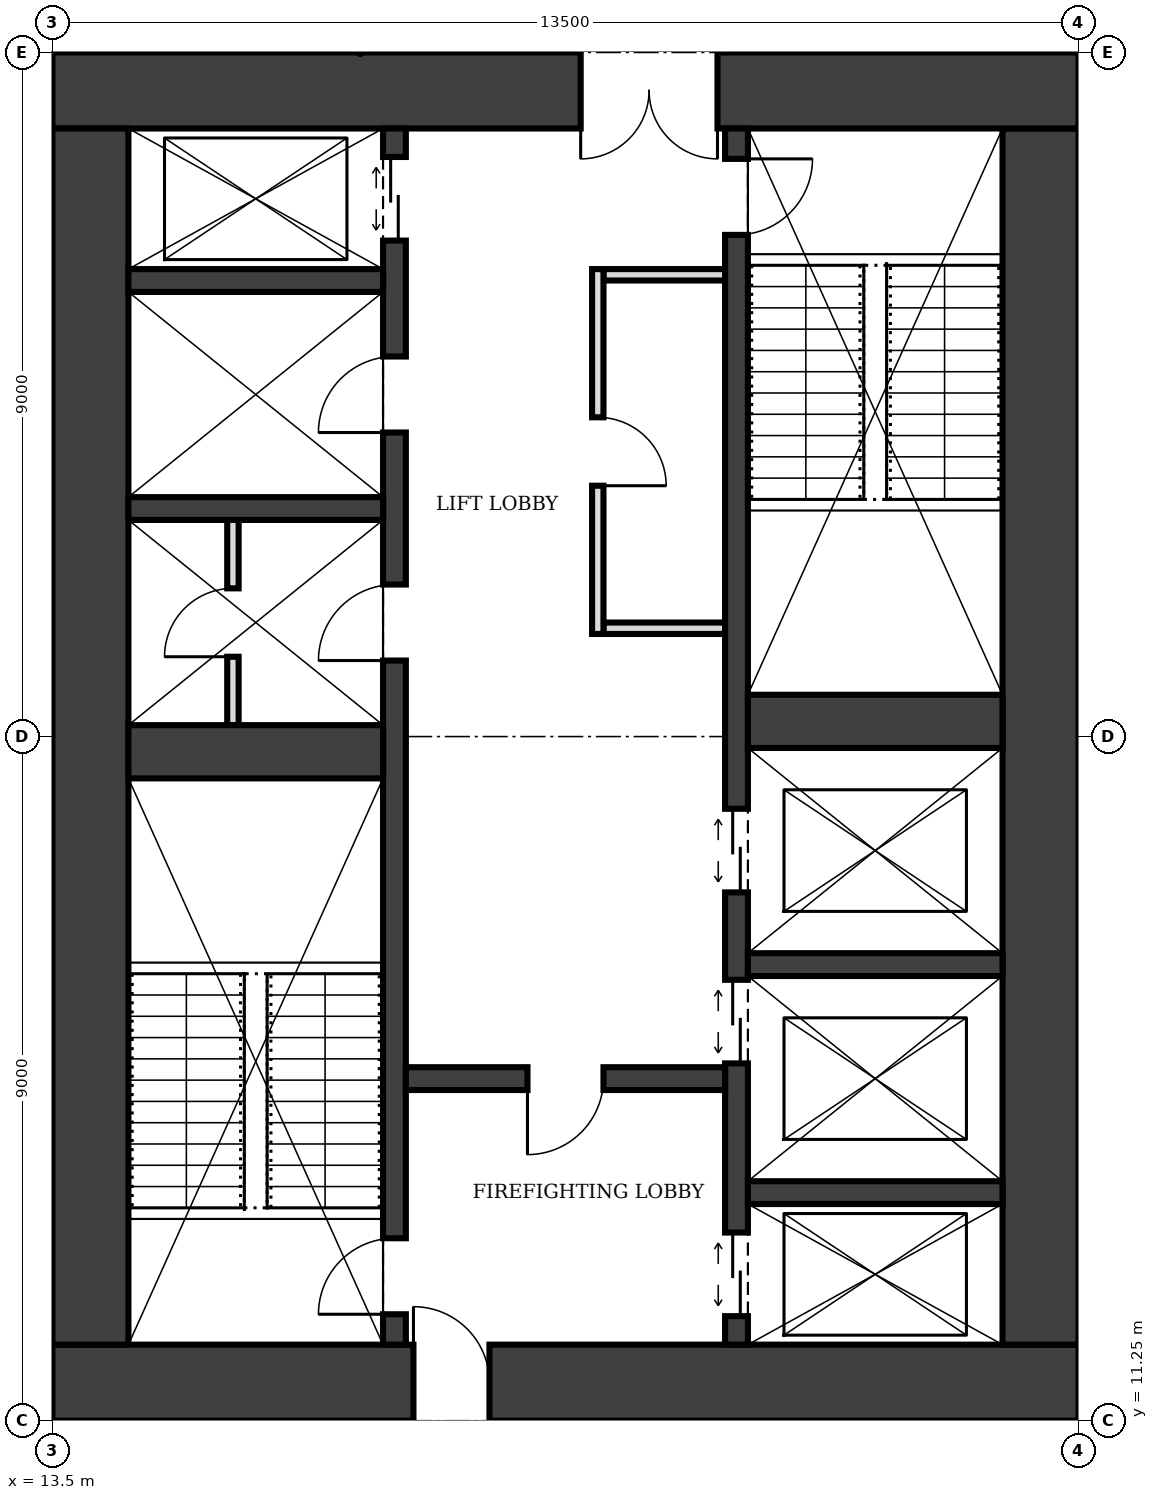
"""IFC4 building model, lengths in metres.
Left out: names, types, materials, properties, quantities, classifications, styles, units other than length and angle.
Written with IfcOpenShell. Run it as: python <this file> out.ifc"""

import sys

from ifc_helpers import new_model, si_unit, direction, frame, frame_2d, origin, place, context, subcontext, project, spatial, rectangle, extrude, element, fill, save


model = new_model("IFC4")
c1 = context("Model", 3, precision=1e-05, world=origin(), true_north=direction((0.0, 1.0)))
c2 = subcontext(c1, "Body", "Model", "MODEL_VIEW")
j1 = project(units=[si_unit("LENGTHUNIT", "METRE"), si_unit("PLANEANGLEUNIT", "RADIAN")], contexts=[c1])
p1 = place(None, origin())
s1 = spatial("IfcSite", under=j1, at=p1, CompositionType="ELEMENT")
p2 = place(p1, origin())
s2 = spatial("IfcBuilding", under=s1, at=p2, CompositionType="ELEMENT")
p3 = place(p2, frame((0.0, 0.0, 205.0)))
s3 = spatial("IfcBuildingStorey", under=s2, at=p3, CompositionType="ELEMENT", Elevation=205.0)
p4 = place(p3, frame((13.5, 11.75, 0.0), z_axis=(0.0, 0.0, 1.0), x_axis=(1.0, 0.0, 0.0)))
e1 = element("IfcWall", 1, at=p4, inside=s3, PredefinedType="SHEAR", context=c2, shape_type="SweptSolid", body=[
    extrude(rectangle(XDim=13.5, YDim=1.0, at=frame_2d((6.75, 0.0))), origin(), (0.0, 0.0, 1.0), 4.0),
])
p5 = place(p4, frame((4.75, 0.0, 0.0)))
e2 = element("IfcOpeningElement", 2, at=p5, cuts=e1, PredefinedType="OPENING", context=c2, shape_type="SweptSolid", body=[
    extrude(rectangle(XDim=1.0, YDim=2.1, at=frame_2d((0.5, 1.05))), frame((0.0, 0.51, 0.0), z_axis=(0.0, -1.0, 0.0), x_axis=(1.0, 0.0, 0.0)), (0.0, 0.0, 1.0), 1.02),
])
p6 = place(p3, frame((26.5, 12.25, 0.0), z_axis=(0.0, 0.0, 1.0), x_axis=(0.0, 1.0, 0.0)))
e3 = element("IfcWall", 3, at=p6, inside=s3, PredefinedType="SHEAR", context=c2, shape_type="SweptSolid", body=[
    extrude(rectangle(XDim=16.0, YDim=1.0, at=frame_2d((8.0, 0.0))), origin(), (0.0, 0.0, 1.0), 4.0),
])
p7 = place(p3, frame((27.0, 28.75, 0.0), z_axis=(0.0, 0.0, 1.0), x_axis=(-1.0, 0.0, 0.0)))
e4 = element("IfcWall", 4, at=p7, inside=s3, PredefinedType="SHEAR", context=c2, shape_type="SweptSolid", body=[
    extrude(rectangle(XDim=13.5, YDim=1.0, at=frame_2d((6.75, 0.0))), origin(), (0.0, 0.0, 1.0), 4.0),
])
p8 = place(p7, frame((4.75, 0.0, 0.0)))
e5 = element("IfcOpeningElement", 5, at=p8, cuts=e4, PredefinedType="OPENING", context=c2, shape_type="SweptSolid", body=[
    extrude(rectangle(XDim=1.8, YDim=2.1, at=frame_2d((0.9, 1.05))), frame((0.0, 0.51, 0.0), z_axis=(0.0, -1.0, 0.0), x_axis=(1.0, 0.0, 0.0)), (0.0, 0.0, 1.0), 1.02),
])
p9 = place(p3, frame((14.0, 28.25, 0.0), z_axis=(0.0, 0.0, 1.0), x_axis=(0.0, -1.0, 0.0)))
e6 = element("IfcWall", 6, at=p9, inside=s3, PredefinedType="SHEAR", context=c2, shape_type="SweptSolid", body=[
    extrude(rectangle(XDim=16.0, YDim=1.0, at=frame_2d((8.0, 0.0))), origin(), (0.0, 0.0, 1.0), 4.0),
])
p10 = place(p3, frame((18.0, 12.25, 0.0), z_axis=(0.0, 0.0, 1.0), x_axis=(0.0, 1.0, 0.0)))
e7 = element("IfcWall", 7, at=p10, inside=s3, PredefinedType="SHEAR", context=c2, shape_type="SweptSolid", body=[
    extrude(rectangle(XDim=16.0, YDim=0.3, at=frame_2d((8.0, 0.0))), origin(), (0.0, 0.0, 1.0), 4.0),
])
p11 = place(p10, frame((0.4, 0.0, 0.0)))
e8 = element("IfcOpeningElement", 8, at=p11, cuts=e7, PredefinedType="OPENING", context=c2, shape_type="SweptSolid", body=[
    extrude(rectangle(XDim=1.0, YDim=2.1, at=frame_2d((0.5, 1.05))), frame((0.0, 0.16, 0.0), z_axis=(0.0, -1.0, 0.0), x_axis=(1.0, 0.0, 0.0)), (0.0, 0.0, 1.0), 0.32),
])
p12 = place(p10, frame((14.525, 0.0, 0.0)))
e9 = element("IfcOpeningElement", 9, at=p12, cuts=e7, PredefinedType="OPENING", context=c2, shape_type="SweptSolid", body=[
    extrude(rectangle(XDim=1.1, YDim=2.1, at=frame_2d((0.55, 1.05))), frame((0.0, 0.16, 0.0), z_axis=(0.0, -1.0, 0.0), x_axis=(1.0, 0.0, 0.0)), (0.0, 0.0, 1.0), 0.32),
])
p13 = place(p10, frame((9.0, 0.0, 0.0)))
e10 = element("IfcOpeningElement", 10, at=p13, cuts=e7, PredefinedType="OPENING", context=c2, shape_type="SweptSolid", body=[
    extrude(rectangle(XDim=1.0, YDim=2.1, at=frame_2d((0.5, 1.05))), frame((0.0, 0.16, 0.0), z_axis=(0.0, -1.0, 0.0), x_axis=(1.0, 0.0, 0.0)), (0.0, 0.0, 1.0), 0.32),
])
p14 = place(p10, frame((12.0, 0.0, 0.0)))
e11 = element("IfcOpeningElement", 11, at=p14, cuts=e7, PredefinedType="OPENING", context=c2, shape_type="SweptSolid", body=[
    extrude(rectangle(XDim=1.0, YDim=2.1, at=frame_2d((0.5, 1.05))), frame((0.0, 0.16, 0.0), z_axis=(0.0, -1.0, 0.0), x_axis=(1.0, 0.0, 0.0)), (0.0, 0.0, 1.0), 0.32),
])
p15 = place(p3, frame((22.5, 12.25, 0.0), z_axis=(0.0, 0.0, 1.0), x_axis=(0.0, 1.0, 0.0)))
e12 = element("IfcWall", 12, at=p15, inside=s3, PredefinedType="SHEAR", context=c2, shape_type="SweptSolid", body=[
    extrude(rectangle(XDim=16.0, YDim=0.3, at=frame_2d((8.0, 0.0))), origin(), (0.0, 0.0, 1.0), 4.0),
])
p16 = place(p15, frame((14.6, 0.0, 0.0)))
e13 = element("IfcOpeningElement", 13, at=p16, cuts=e12, PredefinedType="OPENING", context=c2, shape_type="SweptSolid", body=[
    extrude(rectangle(XDim=1.0, YDim=2.1, at=frame_2d((0.5, 1.05))), frame((0.0, 0.16, 0.0), z_axis=(0.0, -1.0, 0.0), x_axis=(1.0, 0.0, 0.0)), (0.0, 0.0, 1.0), 0.32),
])
p17 = place(p15, frame((0.375, 0.0, 0.0)))
e14 = element("IfcOpeningElement", 14, at=p17, cuts=e12, PredefinedType="OPENING", context=c2, shape_type="SweptSolid", body=[
    extrude(rectangle(XDim=1.1, YDim=2.1, at=frame_2d((0.55, 1.05))), frame((0.0, 0.16, 0.0), z_axis=(0.0, -1.0, 0.0), x_axis=(1.0, 0.0, 0.0)), (0.0, 0.0, 1.0), 0.32),
])
p18 = place(p15, frame((3.7, 0.0, 0.0)))
e15 = element("IfcOpeningElement", 15, at=p18, cuts=e12, PredefinedType="OPENING", context=c2, shape_type="SweptSolid", body=[
    extrude(rectangle(XDim=1.1, YDim=2.1, at=frame_2d((0.55, 1.05))), frame((0.0, 0.16, 0.0), z_axis=(0.0, -1.0, 0.0), x_axis=(1.0, 0.0, 0.0)), (0.0, 0.0, 1.0), 0.32),
])
p19 = place(p15, frame((5.95, 0.0, 0.0)))
e16 = element("IfcOpeningElement", 16, at=p19, cuts=e12, PredefinedType="OPENING", context=c2, shape_type="SweptSolid", body=[
    extrude(rectangle(XDim=1.1, YDim=2.1, at=frame_2d((0.55, 1.05))), frame((0.0, 0.16, 0.0), z_axis=(0.0, -1.0, 0.0), x_axis=(1.0, 0.0, 0.0)), (0.0, 0.0, 1.0), 0.32),
])
p20 = place(p3, frame((14.5, 20.05, 0.0), z_axis=(0.0, 0.0, 1.0), x_axis=(1.0, 0.0, 0.0)))
e17 = element("IfcWall", 17, at=p20, inside=s3, PredefinedType="SHEAR", context=c2, shape_type="SweptSolid", body=[
    extrude(rectangle(XDim=3.35, YDim=0.7, at=frame_2d((1.675, 0.0))), origin(), (0.0, 0.0, 1.0), 4.0),
])
p21 = place(p3, frame((18.15, 15.75, 0.0), z_axis=(0.0, 0.0, 1.0), x_axis=(1.0, 0.0, 0.0)))
e18 = element("IfcWall", 18, at=p21, inside=s3, PredefinedType="SHEAR", context=c2, shape_type="SweptSolid", body=[
    extrude(rectangle(XDim=4.2, YDim=0.3, at=frame_2d((2.1, 0.0))), origin(), (0.0, 0.0, 1.0), 4.0),
])
p22 = place(p21, frame((1.6, 0.0, 0.0)))
e19 = element("IfcOpeningElement", 19, at=p22, cuts=e18, PredefinedType="OPENING", context=c2, shape_type="SweptSolid", body=[
    extrude(rectangle(XDim=1.0, YDim=2.1, at=frame_2d((0.5, 1.05))), frame((0.0, 0.16, 0.0), z_axis=(0.0, -1.0, 0.0), x_axis=(1.0, 0.0, 0.0)), (0.0, 0.0, 1.0), 0.32),
])
for number, where, z_axis, x_axis in (
    (20, (22.65, 14.25, 0.0), (0.0, 0.0, 1.0), (1.0, 0.0, 0.0)),
    (21, (22.65, 17.25, 0.0), (0.0, 0.0, 1.0), (1.0, 0.0, 0.0)),
):
    element("IfcWall", number, at=place(p3, frame(where, z_axis=z_axis, x_axis=x_axis)), inside=s3, PredefinedType="SHEAR", context=c2, shape_type="SweptSolid", body=[
        extrude(rectangle(XDim=3.35, YDim=0.3, at=frame_2d((1.675, 0.0))), origin(), (0.0, 0.0, 1.0), 4.0),
    ])
p23 = place(p3, frame((22.65, 20.45, 0.0), z_axis=(0.0, 0.0, 1.0), x_axis=(1.0, 0.0, 0.0)))
e22 = element("IfcWall", 22, at=p23, inside=s3, PredefinedType="SHEAR", context=c2, shape_type="SweptSolid", body=[
    extrude(rectangle(XDim=3.35, YDim=0.7, at=frame_2d((1.675, 0.0))), origin(), (0.0, 0.0, 1.0), 4.0),
])
for number, where, z_axis, x_axis in (
    (23, (14.5, 23.25, 0.0), (0.0, 0.0, 1.0), (1.0, 0.0, 0.0)),
    (24, (14.5, 26.25, 0.0), (0.0, 0.0, 1.0), (1.0, 0.0, 0.0)),
):
    element("IfcWall", number, at=place(p3, frame(where, z_axis=z_axis, x_axis=x_axis)), inside=s3, PredefinedType="SHEAR", context=c2, shape_type="SweptSolid", body=[
        extrude(rectangle(XDim=3.35, YDim=0.3, at=frame_2d((1.675, 0.0))), origin(), (0.0, 0.0, 1.0), 4.0),
    ])
p24 = place(p3, frame((20.675, 21.6, 0.0), z_axis=(0.0, 0.0, 1.0), x_axis=(0.0, 1.0, 0.0)))
e25 = element("IfcWall", 25, at=p24, inside=s3, PredefinedType="PARTITIONING", context=c2, shape_type="SweptSolid", body=[
    extrude(rectangle(XDim=4.8, YDim=0.15, at=frame_2d((2.4, 0.0))), origin(), (0.0, 0.0, 1.0), 3.75),
])
p25 = place(p24, frame((1.95, 0.0, 0.0)))
e26 = element("IfcOpeningElement", 26, at=p25, cuts=e25, PredefinedType="OPENING", context=c2, shape_type="SweptSolid", body=[
    extrude(rectangle(XDim=0.9, YDim=2.1, at=frame_2d((0.45, 1.05))), frame((0.0, 0.085, 0.0), z_axis=(0.0, -1.0, 0.0), x_axis=(1.0, 0.0, 0.0)), (0.0, 0.0, 1.0), 0.17),
])
for number, where, z_axis, x_axis in (
    (27, (20.75, 21.675, 0.0), (0.0, 0.0, 1.0), (1.0, 0.0, 0.0)),
    (28, (20.75, 26.325, 0.0), (0.0, 0.0, 1.0), (1.0, 0.0, 0.0)),
):
    element("IfcWall", number, at=place(p3, frame(where, z_axis=z_axis, x_axis=x_axis)), inside=s3, PredefinedType="PARTITIONING", context=c2, shape_type="SweptSolid", body=[
        extrude(rectangle(XDim=1.6, YDim=0.15, at=frame_2d((0.8, 0.0))), origin(), (0.0, 0.0, 1.0), 3.75),
    ])
p26 = place(p3, frame((15.875, 20.4, 0.0), z_axis=(0.0, 0.0, 1.0), x_axis=(0.0, 1.0, 0.0)))
e29 = element("IfcWall", 29, at=p26, inside=s3, PredefinedType="PARTITIONING", context=c2, shape_type="SweptSolid", body=[
    extrude(rectangle(XDim=2.7, YDim=0.15, at=frame_2d((1.35, 0.0))), origin(), (0.0, 0.0, 1.0), 3.75),
])
p27 = place(p26, frame((0.9, 0.0, 0.0)))
e30 = element("IfcOpeningElement", 30, at=p27, cuts=e29, PredefinedType="OPENING", context=c2, shape_type="SweptSolid", body=[
    extrude(rectangle(XDim=0.9, YDim=2.1, at=frame_2d((0.45, 1.05))), frame((0.0, 0.085, 0.0), z_axis=(0.0, -1.0, 0.0), x_axis=(1.0, 0.0, 0.0)), (0.0, 0.0, 1.0), 0.17),
])
p28 = place(p5, origin())
e31 = element("IfcDoor", 31, at=p28, inside=s3, OperationType="SINGLE_SWING_LEFT", PredefinedType="DOOR", context=c2, shape_type="SweptSolid", body=[
    extrude(rectangle(XDim=1.0, YDim=2.1, at=frame_2d((0.5, 1.05))), frame((0.0, 0.025, 0.0), z_axis=(0.0, -1.0, 0.0), x_axis=(1.0, 0.0, 0.0)), (0.0, 0.0, 1.0), 0.05),
])
fill(e2, e31)
p29 = place(p8, origin())
e32 = element("IfcDoor", 32, at=p29, inside=s3, OperationType="DOUBLE_DOOR_SINGLE_SWING", PredefinedType="DOOR", context=c2, shape_type="SweptSolid", body=[
    extrude(rectangle(XDim=1.8, YDim=2.1, at=frame_2d((0.9, 1.05))), frame((0.0, 0.025, 0.0), z_axis=(0.0, -1.0, 0.0), x_axis=(1.0, 0.0, 0.0)), (0.0, 0.0, 1.0), 0.05),
])
fill(e5, e32)
p30 = place(p22, frame((1.0, 0.0, 0.0), z_axis=(0.0, 0.0, 1.0), x_axis=(-1.0, 0.0, 0.0)))
e33 = element("IfcDoor", 33, at=p30, inside=s3, OperationType="SINGLE_SWING_RIGHT", PredefinedType="DOOR", context=c2, shape_type="SweptSolid", body=[
    extrude(rectangle(XDim=1.0, YDim=2.1, at=frame_2d((0.5, 1.05))), frame((0.0, 0.025, 0.0), z_axis=(0.0, -1.0, 0.0), x_axis=(1.0, 0.0, 0.0)), (0.0, 0.0, 1.0), 0.05),
])
fill(e19, e33)
p31 = place(p11, origin())
e34 = element("IfcDoor", 34, at=p31, inside=s3, OperationType="SINGLE_SWING_LEFT", PredefinedType="DOOR", context=c2, shape_type="SweptSolid", body=[
    extrude(rectangle(XDim=1.0, YDim=2.1, at=frame_2d((0.5, 1.05))), frame((0.0, 0.025, 0.0), z_axis=(0.0, -1.0, 0.0), x_axis=(1.0, 0.0, 0.0)), (0.0, 0.0, 1.0), 0.05),
])
fill(e8, e34)
p32 = place(p16, frame((1.0, 0.0, 0.0), z_axis=(0.0, 0.0, 1.0), x_axis=(-1.0, 0.0, 0.0)))
e35 = element("IfcDoor", 35, at=p32, inside=s3, OperationType="SINGLE_SWING_LEFT", PredefinedType="DOOR", context=c2, shape_type="SweptSolid", body=[
    extrude(rectangle(XDim=1.0, YDim=2.1, at=frame_2d((0.5, 1.05))), frame((0.0, 0.025, 0.0), z_axis=(0.0, -1.0, 0.0), x_axis=(1.0, 0.0, 0.0)), (0.0, 0.0, 1.0), 0.05),
])
fill(e13, e35)
p33 = place(p17, origin())
e36 = element("IfcDoor", 36, at=p33, inside=s3, OperationType="DOUBLE_DOOR_SLIDING", PredefinedType="DOOR", context=c2, shape_type="SweptSolid", body=[
    extrude(rectangle(XDim=1.1, YDim=2.1, at=frame_2d((0.55, 1.05))), frame((0.0, 0.025, 0.0), z_axis=(0.0, -1.0, 0.0), x_axis=(1.0, 0.0, 0.0)), (0.0, 0.0, 1.0), 0.05),
])
fill(e14, e36)
p34 = place(p12, origin())
e37 = element("IfcDoor", 37, at=p34, inside=s3, OperationType="DOUBLE_DOOR_SLIDING", PredefinedType="DOOR", context=c2, shape_type="SweptSolid", body=[
    extrude(rectangle(XDim=1.1, YDim=2.1, at=frame_2d((0.55, 1.05))), frame((0.0, 0.025, 0.0), z_axis=(0.0, -1.0, 0.0), x_axis=(1.0, 0.0, 0.0)), (0.0, 0.0, 1.0), 0.05),
])
fill(e9, e37)
p35 = place(p18, origin())
e38 = element("IfcDoor", 38, at=p35, inside=s3, OperationType="DOUBLE_DOOR_SLIDING", PredefinedType="DOOR", context=c2, shape_type="SweptSolid", body=[
    extrude(rectangle(XDim=1.1, YDim=2.1, at=frame_2d((0.55, 1.05))), frame((0.0, 0.025, 0.0), z_axis=(0.0, -1.0, 0.0), x_axis=(1.0, 0.0, 0.0)), (0.0, 0.0, 1.0), 0.05),
])
fill(e15, e38)
p36 = place(p19, origin())
e39 = element("IfcDoor", 39, at=p36, inside=s3, OperationType="DOUBLE_DOOR_SLIDING", PredefinedType="DOOR", context=c2, shape_type="SweptSolid", body=[
    extrude(rectangle(XDim=1.1, YDim=2.1, at=frame_2d((0.55, 1.05))), frame((0.0, 0.025, 0.0), z_axis=(0.0, -1.0, 0.0), x_axis=(1.0, 0.0, 0.0)), (0.0, 0.0, 1.0), 0.05),
])
fill(e16, e39)
p37 = place(p25, frame((0.9, 0.0, 0.0), z_axis=(0.0, 0.0, 1.0), x_axis=(-1.0, 0.0, 0.0)))
e40 = element("IfcDoor", 40, at=p37, inside=s3, OperationType="SINGLE_SWING_RIGHT", PredefinedType="DOOR", context=c2, shape_type="SweptSolid", body=[
    extrude(rectangle(XDim=0.9, YDim=2.1, at=frame_2d((0.45, 1.05))), frame((0.0, 0.025, 0.0), z_axis=(0.0, -1.0, 0.0), x_axis=(1.0, 0.0, 0.0)), (0.0, 0.0, 1.0), 0.05),
])
fill(e26, e40)
p38 = place(p13, origin())
e41 = element("IfcDoor", 41, at=p38, inside=s3, OperationType="SINGLE_SWING_LEFT", PredefinedType="DOOR", context=c2, shape_type="SweptSolid", body=[
    extrude(rectangle(XDim=1.0, YDim=2.1, at=frame_2d((0.5, 1.05))), frame((0.0, 0.025, 0.0), z_axis=(0.0, -1.0, 0.0), x_axis=(1.0, 0.0, 0.0)), (0.0, 0.0, 1.0), 0.05),
])
fill(e10, e41)
p39 = place(p27, origin())
e42 = element("IfcDoor", 42, at=p39, inside=s3, OperationType="SINGLE_SWING_LEFT", PredefinedType="DOOR", context=c2, shape_type="SweptSolid", body=[
    extrude(rectangle(XDim=0.9, YDim=2.1, at=frame_2d((0.45, 1.05))), frame((0.0, 0.025, 0.0), z_axis=(0.0, -1.0, 0.0), x_axis=(1.0, 0.0, 0.0)), (0.0, 0.0, 1.0), 0.05),
])
fill(e30, e42)
p40 = place(p14, origin())
e43 = element("IfcDoor", 43, at=p40, inside=s3, OperationType="SINGLE_SWING_LEFT", PredefinedType="DOOR", context=c2, shape_type="SweptSolid", body=[
    extrude(rectangle(XDim=1.0, YDim=2.1, at=frame_2d((0.5, 1.05))), frame((0.0, 0.025, 0.0), z_axis=(0.0, -1.0, 0.0), x_axis=(1.0, 0.0, 0.0)), (0.0, 0.0, 1.0), 0.05),
])
fill(e11, e43)
save(model, sys.argv[1])
